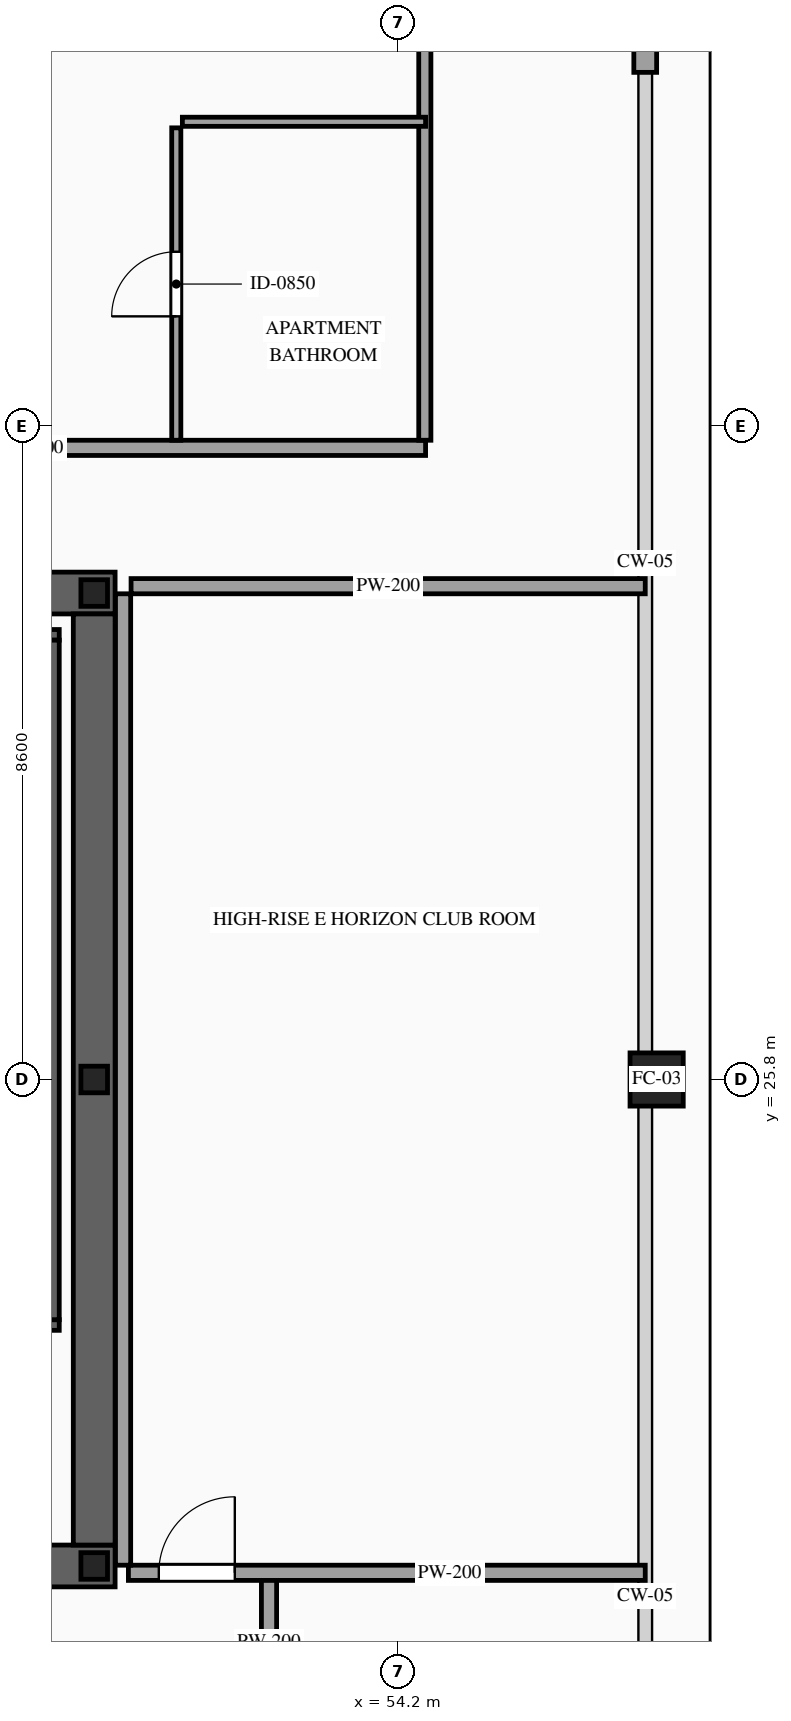
"""IFC4 building model, lengths in metres.
Left out: names, types, materials, properties, quantities, classifications, styles, units other than length and angle.
Written with IfcOpenShell. Run it as: python <this file> out.ifc"""

import sys

from ifc_helpers import new_model, si_unit, direction, frame, frame_2d, origin, origin_2d, place, context, subcontext, project, spatial, rectangle, hollow_rectangle, i_section, extrude, source, transform, mapped, element, fill, save


model = new_model("IFC4")
c1 = context("Model", 3, precision=1e-05, world=origin(), true_north=direction((0.0, 1.0)))
c2 = subcontext(c1, "Body", "Model", "MODEL_VIEW")
j1 = project(units=[si_unit("LENGTHUNIT", "METRE"), si_unit("PLANEANGLEUNIT", "RADIAN")], contexts=[c1])
p1 = place(None, origin())
s1 = spatial("IfcSite", under=j1, at=p1, CompositionType="ELEMENT")
p2 = place(p1, origin())
s2 = spatial("IfcBuilding", under=s1, at=p2, CompositionType="ELEMENT")
p3 = place(p2, frame((0.0, 0.0, 271.6)))
s3 = spatial("IfcBuildingStorey", under=s2, at=p3, CompositionType="ELEMENT", Elevation=271.6)
p4 = place(p3, frame((23.525, 19.4, 0.0), z_axis=(0.0, 0.0, 1.0), x_axis=(1.0, 0.0, 0.0)))
e1 = element("IfcWall", 1, at=p4, inside=s3, PredefinedType="SHEAR", context=c2, shape_type="SweptSolid", body=[
    extrude(rectangle(XDim=26.95, YDim=0.55, at=frame_2d((13.475, 0.0))), origin(), (0.0, 0.0, 1.0), 3.5),
])
p5 = place(p4, frame((1.925, 0.0, 0.0)))
e2 = element("IfcOpeningElement", 2, at=p5, cuts=e1, PredefinedType="OPENING", context=c2, shape_type="SweptSolid", body=[
    extrude(rectangle(XDim=1.1, YDim=2.2, at=frame_2d((0.55, 1.1))), frame((0.0, 0.29, 0.0), z_axis=(0.0, -1.0, 0.0), x_axis=(1.0, 0.0, 0.0)), (0.0, 0.0, 1.0), 0.58),
])
p6 = place(p4, frame((9.825, 0.0, 0.0)))
e3 = element("IfcOpeningElement", 3, at=p6, cuts=e1, PredefinedType="OPENING", context=c2, shape_type="SweptSolid", body=[
    extrude(rectangle(XDim=1.1, YDim=2.2, at=frame_2d((0.55, 1.1))), frame((0.0, 0.29, 0.0), z_axis=(0.0, -1.0, 0.0), x_axis=(1.0, 0.0, 0.0)), (0.0, 0.0, 1.0), 0.58),
])
p7 = place(p4, frame((23.025, 0.0, 0.0)))
e4 = element("IfcOpeningElement", 4, at=p7, cuts=e1, PredefinedType="OPENING", context=c2, shape_type="SweptSolid", body=[
    extrude(rectangle(XDim=1.1, YDim=2.2, at=frame_2d((0.55, 1.1))), frame((0.0, 0.29, 0.0), z_axis=(0.0, -1.0, 0.0), x_axis=(1.0, 0.0, 0.0)), (0.0, 0.0, 1.0), 0.58),
])
p8 = place(p4, frame((19.645, 0.0, 0.0)))
e5 = element("IfcOpeningElement", 5, at=p8, cuts=e1, PredefinedType="OPENING", context=c2, shape_type="SweptSolid", body=[
    extrude(rectangle(XDim=0.9, YDim=2.15, at=frame_2d((0.45, 1.075))), frame((0.0, 0.29, 0.0), z_axis=(0.0, -1.0, 0.0), x_axis=(1.0, 0.0, 0.0)), (0.0, 0.0, 1.0), 0.58),
])
p9 = place(p4, frame((18.205, 0.0, 0.0)))
e6 = element("IfcOpeningElement", 6, at=p9, cuts=e1, PredefinedType="OPENING", context=c2, shape_type="SweptSolid", body=[
    extrude(rectangle(XDim=0.9, YDim=2.15, at=frame_2d((0.45, 1.075))), frame((0.0, 0.29, 0.0), z_axis=(0.0, -1.0, 0.0), x_axis=(1.0, 0.0, 0.0)), (0.0, 0.0, 1.0), 0.58),
])
p10 = place(p3, frame((23.525, 32.2, 0.0), z_axis=(0.0, 0.0, 1.0), x_axis=(1.0, 0.0, 0.0)))
e7 = element("IfcWall", 7, at=p10, inside=s3, PredefinedType="SHEAR", context=c2, shape_type="SweptSolid", body=[
    extrude(rectangle(XDim=26.95, YDim=0.55, at=frame_2d((13.475, 0.0))), origin(), (0.0, 0.0, 1.0), 3.5),
])
p11 = place(p10, frame((4.545, 0.0, 0.0)))
e8 = element("IfcOpeningElement", 8, at=p11, cuts=e7, PredefinedType="OPENING", context=c2, shape_type="SweptSolid", body=[
    extrude(rectangle(XDim=0.9, YDim=2.15, at=frame_2d((0.45, 1.075))), frame((0.0, 0.29, 0.0), z_axis=(0.0, -1.0, 0.0), x_axis=(1.0, 0.0, 0.0)), (0.0, 0.0, 1.0), 0.58),
])
p12 = place(p10, frame((9.825, 0.0, 0.0)))
e9 = element("IfcOpeningElement", 9, at=p12, cuts=e7, PredefinedType="OPENING", context=c2, shape_type="SweptSolid", body=[
    extrude(rectangle(XDim=1.1, YDim=2.2, at=frame_2d((0.55, 1.1))), frame((0.0, 0.29, 0.0), z_axis=(0.0, -1.0, 0.0), x_axis=(1.0, 0.0, 0.0)), (0.0, 0.0, 1.0), 0.58),
])
p13 = place(p10, frame((15.675, 0.0, 0.0)))
e10 = element("IfcOpeningElement", 10, at=p13, cuts=e7, PredefinedType="OPENING", context=c2, shape_type="SweptSolid", body=[
    extrude(rectangle(XDim=1.1, YDim=2.2, at=frame_2d((0.55, 1.1))), frame((0.0, 0.29, 0.0), z_axis=(0.0, -1.0, 0.0), x_axis=(1.0, 0.0, 0.0)), (0.0, 0.0, 1.0), 0.58),
])
p14 = place(p10, frame((18.775, 0.0, 0.0)))
e11 = element("IfcOpeningElement", 11, at=p14, cuts=e7, PredefinedType="OPENING", context=c2, shape_type="SweptSolid", body=[
    extrude(rectangle(XDim=1.1, YDim=2.2, at=frame_2d((0.55, 1.1))), frame((0.0, 0.29, 0.0), z_axis=(0.0, -1.0, 0.0), x_axis=(1.0, 0.0, 0.0)), (0.0, 0.0, 1.0), 0.58),
])
m1 = source(origin(), c2, "Body", "SweptSolid", [
    extrude(rectangle(XDim=12.25, YDim=0.55, at=frame_2d((6.125, 0.0))), origin(), (0.0, 0.0, 1.0), 3.5),
])
p15 = place(p3, frame((50.2, 19.675, 0.0), z_axis=(0.0, 0.0, 1.0), x_axis=(0.0, 1.0, 0.0)))
e12 = element("IfcWall", 12, at=p15, inside=s3, PredefinedType="SHEAR", context=c2, shape_type="MappedRepresentation", body=[
    mapped(m1, transform((0.0, 0.0, 0.0), scale=1.0)),
])
m2 = source(origin(), c2, "Body", "SweptSolid", [
    extrude(i_section(OverallWidth=0.35, OverallDepth=0.35, WebThickness=0.012, FlangeThickness=0.019, at=origin_2d()), origin(), (0.0, 0.0, 1.0), 3.5),
])
for number, where, z_axis, x_axis in (
    (13, (50.2, 19.4, 0.0), (0.0, 0.0, 1.0), (1.0, 0.0, 0.0)),
    (14, (50.2, 25.8, 0.0), (0.0, 0.0, 1.0), (1.0, 0.0, 0.0)),
    (15, (50.2, 32.2, 0.0), (0.0, 0.0, 1.0), (1.0, 0.0, 0.0)),
):
    element("IfcColumn", number, at=place(p3, frame(where, z_axis=z_axis, x_axis=x_axis)), inside=s3, PredefinedType="COLUMN", context=c2, shape_type="MappedRepresentation", body=[
        mapped(m2, transform((0.0, 0.0, 0.0), scale=1.0)),
    ])
m3 = source(origin(), c2, "Body", "SweptSolid", [
    extrude(hollow_rectangle(XDim=0.7, YDim=0.7, WallThickness=0.032, at=origin_2d()), origin(), (0.0, 0.0, 1.0), 3.5),
])
p16 = place(p3, frame((57.6, 25.8, 0.0), z_axis=(0.0, 0.0, 1.0), x_axis=(1.0, 0.0, 0.0)))
e16 = element("IfcColumn", 16, at=p16, inside=s3, PredefinedType="COLUMN", context=c2, shape_type="MappedRepresentation", body=[
    mapped(m3, transform((0.0, 0.0, 0.0), scale=1.0)),
])
m4 = source(origin(), c2, "Body", "SweptSolid", [
    extrude(rectangle(XDim=3.15, YDim=0.3, at=frame_2d((1.575, 0.0))), origin(), (0.0, 0.0, 1.0), 2.835),
])
p17 = place(p3, frame((57.45, 39.05, 0.0), z_axis=(0.0, 0.0, 1.0), x_axis=(0.0, 1.0, 0.0)))
e17 = element("IfcWall", 17, at=p17, inside=s3, PredefinedType="SOLIDWALL", context=c2, shape_type="MappedRepresentation", body=[
    mapped(m4, transform((0.0, 0.0, 0.0), scale=1.0)),
])
p18 = place(p3, frame((46.46, 22.57, 0.0), z_axis=(0.0, 0.0, 1.0), x_axis=(1.0, 0.0, 0.0)))
e18 = element("IfcWall", 18, at=p18, inside=s3, PredefinedType="SOLIDWALL", context=c2, shape_type="SweptSolid", body=[
    extrude(rectangle(XDim=3.28, YDim=0.14, at=frame_2d((1.64, 0.0))), origin(), (0.0, 0.0, 1.0), 3.28),
])
p19 = place(p18, frame((1.09, 0.0, 0.0)))
e19 = element("IfcOpeningElement", 19, at=p19, cuts=e18, PredefinedType="OPENING", context=c2, shape_type="SweptSolid", body=[
    extrude(rectangle(XDim=1.1, YDim=2.2, at=frame_2d((0.55, 1.1))), frame((0.0, 0.085, 0.0), z_axis=(0.0, -1.0, 0.0), x_axis=(1.0, 0.0, 0.0)), (0.0, 0.0, 1.0), 0.17),
])
m5 = source(origin(), c2, "Body", "SweptSolid", [
    extrude(rectangle(XDim=3.28, YDim=0.14, at=frame_2d((1.64, 0.0))), origin(), (0.0, 0.0, 1.0), 3.28),
])
p20 = place(p3, frame((46.46, 31.65, 0.0), z_axis=(0.0, 0.0, 1.0), x_axis=(1.0, 0.0, 0.0)))
e20 = element("IfcWall", 20, at=p20, inside=s3, PredefinedType="SOLIDWALL", context=c2, shape_type="MappedRepresentation", body=[
    mapped(m5, transform((0.0, 0.0, 0.0), scale=1.0)),
])
m6 = source(origin(), c2, "Body", "SweptSolid", [
    extrude(rectangle(XDim=8.94, YDim=0.14, at=frame_2d((4.47, 0.0))), origin(), (0.0, 0.0, 1.0), 3.28),
])
p21 = place(p3, frame((49.67, 22.64, 0.0), z_axis=(0.0, 0.0, 1.0), x_axis=(0.0, 1.0, 0.0)))
e21 = element("IfcWall", 21, at=p21, inside=s3, PredefinedType="SOLIDWALL", context=c2, shape_type="MappedRepresentation", body=[
    mapped(m6, transform((0.0, 0.0, 0.0), scale=1.0)),
])
m7 = source(origin(), c2, "Body", "SweptSolid", [
    extrude(rectangle(XDim=1.7, YDim=0.2, at=frame_2d((0.85, 0.0))), origin(), (0.0, 0.0, 1.0), 3.28),
])
p22 = place(p3, frame((52.5, 17.55, 0.0), z_axis=(0.0, 0.0, 1.0), x_axis=(0.0, 1.0, 0.0)))
e22 = element("IfcWall", 22, at=p22, inside=s3, PredefinedType="PARTITIONING", context=c2, shape_type="MappedRepresentation", body=[
    mapped(m7, transform((0.0, 0.0, 0.0), scale=1.0)),
])
p23 = place(p3, frame((37.08, 34.11, 0.0), z_axis=(0.0, 0.0, 1.0), x_axis=(1.0, 0.0, 0.0)))
e23 = element("IfcWall", 23, at=p23, inside=s3, PredefinedType="PARTITIONING", context=c2, shape_type="SweptSolid", body=[
    extrude(rectangle(XDim=17.48, YDim=0.2, at=frame_2d((8.74, 0.0))), origin(), (0.0, 0.0, 1.0), 3.28),
])
p24 = place(p23, frame((5.865, 0.0, 0.0)))
e24 = element("IfcOpeningElement", 24, at=p24, cuts=e23, PredefinedType="OPENING", context=c2, shape_type="SweptSolid", body=[
    extrude(rectangle(XDim=1.0, YDim=2.2, at=frame_2d((0.5, 1.1))), frame((0.0, 0.115, 0.0), z_axis=(0.0, -1.0, 0.0), x_axis=(1.0, 0.0, 0.0)), (0.0, 0.0, 1.0), 0.23),
])
m8 = source(origin(), c2, "Body", "SweptSolid", [
    extrude(rectangle(XDim=11.89, YDim=0.16, at=frame_2d((5.945, 0.0))), origin(), (0.0, 0.0, 1.0), 3.28),
])
p25 = place(p3, frame((54.55, 34.21, 0.0), z_axis=(0.0, 0.0, 1.0), x_axis=(0.0, 1.0, 0.0)))
e25 = element("IfcWall", 25, at=p25, inside=s3, PredefinedType="PARTITIONING", context=c2, shape_type="MappedRepresentation", body=[
    mapped(m8, transform((0.0, 0.0, 0.0), scale=1.0)),
])
m9 = source(origin(), c2, "Body", "SweptSolid", [
    extrude(rectangle(XDim=3.2, YDim=0.12, at=frame_2d((1.6, 0.0))), origin(), (0.0, 0.0, 1.0), 3.28),
])
p26 = place(p3, frame((51.36, 38.4, 0.0), z_axis=(0.0, 0.0, 1.0), x_axis=(1.0, 0.0, 0.0)))
e26 = element("IfcWall", 26, at=p26, inside=s3, PredefinedType="PARTITIONING", context=c2, shape_type="MappedRepresentation", body=[
    mapped(m9, transform((0.0, 0.0, 0.0), scale=1.0)),
])
p27 = place(p3, frame((51.28, 34.21, 0.0), z_axis=(0.0, 0.0, 1.0), x_axis=(0.0, 1.0, 0.0)))
e27 = element("IfcWall", 27, at=p27, inside=s3, PredefinedType="PARTITIONING", context=c2, shape_type="SweptSolid", body=[
    extrude(rectangle(XDim=4.11, YDim=0.12, at=frame_2d((2.055, 0.0))), origin(), (0.0, 0.0, 1.0), 3.28),
])
p28 = place(p27, frame((1.63, 0.0, 0.0)))
e28 = element("IfcOpeningElement", 28, at=p28, cuts=e27, PredefinedType="OPENING", context=c2, shape_type="SweptSolid", body=[
    extrude(rectangle(XDim=0.85, YDim=2.1, at=frame_2d((0.425, 1.05))), frame((0.0, 0.075, 0.0), z_axis=(0.0, -1.0, 0.0), x_axis=(1.0, 0.0, 0.0)), (0.0, 0.0, 1.0), 0.15),
])
p29 = place(p3, frame((50.65, 19.31, 0.0), z_axis=(0.0, 0.0, 1.0), x_axis=(1.0, 0.0, 0.0)))
e29 = element("IfcWall", 29, at=p29, inside=s3, PredefinedType="PARTITIONING", context=c2, shape_type="SweptSolid", body=[
    extrude(rectangle(XDim=6.8, YDim=0.2, at=frame_2d((3.4, 0.0))), origin(), (0.0, 0.0, 1.0), 2.825),
])
p30 = place(p29, frame((0.4, 0.0, 0.0)))
e30 = element("IfcOpeningElement", 30, at=p30, cuts=e29, PredefinedType="OPENING", context=c2, shape_type="SweptSolid", body=[
    extrude(rectangle(XDim=1.0, YDim=2.2, at=frame_2d((0.5, 1.1))), frame((0.0, 0.115, 0.0), z_axis=(0.0, -1.0, 0.0), x_axis=(1.0, 0.0, 0.0)), (0.0, 0.0, 1.0), 0.23),
])
m10 = source(origin(), c2, "Body", "SweptSolid", [
    extrude(rectangle(XDim=6.765, YDim=0.2, at=frame_2d((3.382, 0.0))), origin(), (0.0, 0.0, 1.0), 2.825),
])
p31 = place(p3, frame((50.685, 32.29, 0.0), z_axis=(0.0, 0.0, 1.0), x_axis=(1.0, 0.0, 0.0)))
e31 = element("IfcWall", 31, at=p31, inside=s3, PredefinedType="PARTITIONING", context=c2, shape_type="MappedRepresentation", body=[
    mapped(m10, transform((0.0, 0.0, 0.0), scale=1.0)),
])
m11 = source(origin(), c2, "Body", "SweptSolid", [
    extrude(rectangle(XDim=12.78, YDim=0.2, at=frame_2d((6.39, 0.0))), origin(), (0.0, 0.0, 1.0), 3.28),
])
p32 = place(p3, frame((50.58, 19.41, 0.0), z_axis=(0.0, 0.0, 1.0), x_axis=(0.0, 1.0, 0.0)))
e32 = element("IfcWall", 32, at=p32, inside=s3, PredefinedType="PARTITIONING", context=c2, shape_type="MappedRepresentation", body=[
    mapped(m11, transform((0.0, 0.0, 0.0), scale=1.0)),
])
m12 = source(origin(), c2, "Body", "SweptSolid", [
    extrude(rectangle(XDim=0.85, YDim=2.1, at=frame_2d((0.425, 1.05))), frame((0.0, 0.025, 0.0), z_axis=(0.0, -1.0, 0.0), x_axis=(1.0, 0.0, 0.0)), (0.0, 0.0, 1.0), 0.05),
])
p33 = place(p28, origin())
e33 = element("IfcDoor", 33, at=p33, inside=s3, OperationType="SINGLE_SWING_LEFT", PredefinedType="DOOR", context=c2, shape_type="MappedRepresentation", body=[
    mapped(m12, transform((0.0, 0.0, 0.0), scale=1.0)),
])
fill(e28, e33)
m13 = source(origin(), c2, "Body", "SweptSolid", [
    extrude(rectangle(XDim=1.0, YDim=2.2, at=frame_2d((0.5, 1.1))), frame((0.0, 0.025, 0.0), z_axis=(0.0, -1.0, 0.0), x_axis=(1.0, 0.0, 0.0)), (0.0, 0.0, 1.0), 0.05),
])
p34 = place(p30, origin())
e34 = element("IfcDoor", 34, at=p34, inside=s3, OperationType="SINGLE_SWING_RIGHT", PredefinedType="DOOR", context=c2, shape_type="MappedRepresentation", body=[
    mapped(m13, transform((0.0, 0.0, 0.0), scale=1.0)),
])
fill(e30, e34)
save(model, sys.argv[1])
